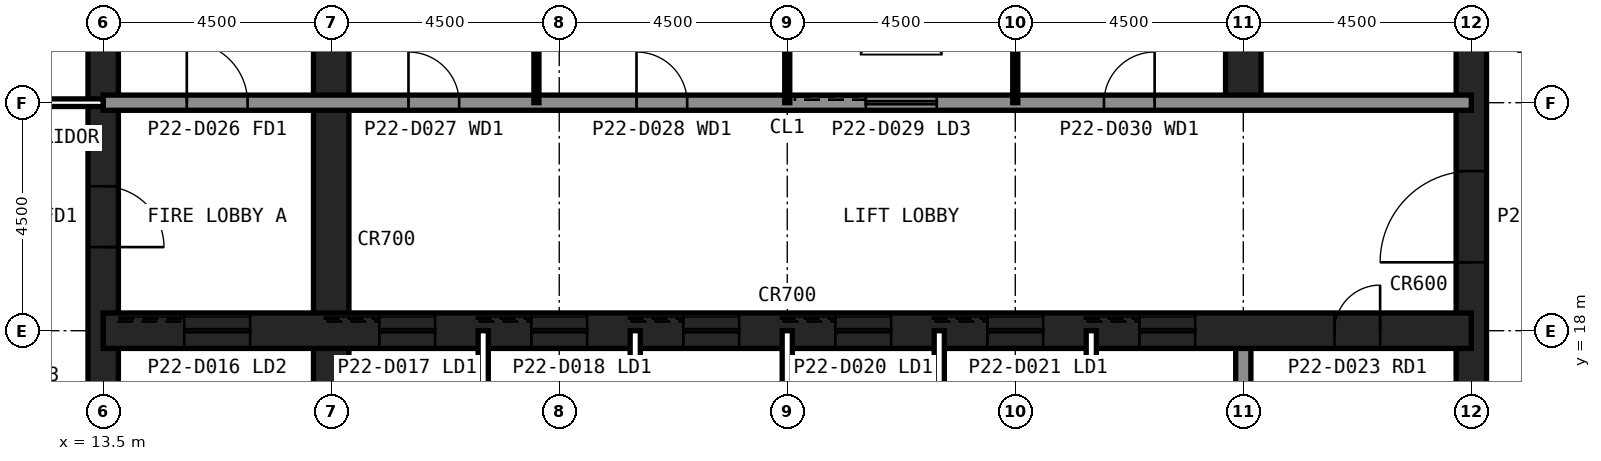
"""IFC4 building model, lengths in metres.
Left out: names, types, materials, properties, quantities, classifications, styles, units other than length and angle.
Written with IfcOpenShell. Run it as: python <this file> out.ifc"""

import sys

from ifc_helpers import new_model, si_unit, direction, frame, frame_2d, origin, place, context, subcontext, project, spatial, rectangle, extrude, element, fill, save


model = new_model("IFC4")
c1 = context("Model", 3, precision=1e-05, world=origin(), true_north=direction((0.0, 1.0)))
c2 = subcontext(c1, "Body", "Model", "MODEL_VIEW")
j1 = project(units=[si_unit("LENGTHUNIT", "METRE"), si_unit("PLANEANGLEUNIT", "RADIAN")], contexts=[c1])
p1 = place(None, origin())
s1 = spatial("IfcSite", under=j1, at=p1, CompositionType="ELEMENT")
p2 = place(p1, origin())
s2 = spatial("IfcBuilding", under=s1, at=p2, CompositionType="ELEMENT")
p3 = place(p2, frame((0.0, 0.0, 96.2)))
s3 = spatial("IfcBuildingStorey", under=s2, at=p3, CompositionType="ELEMENT", Elevation=96.2)
p4 = place(p3, frame((40.5, 13.5, 0.0), z_axis=(0.0, 0.0, 1.0), x_axis=(0.0, 1.0, 0.0)))
e1 = element("IfcWall", 1, at=p4, inside=s3, PredefinedType="SHEAR", context=c2, shape_type="SweptSolid", body=[
    extrude(rectangle(XDim=27.0, YDim=0.6, at=frame_2d((13.5, 0.0))), origin(), (0.0, 0.0, 1.0), 4.2),
])
p5 = place(p4, frame((5.85, 0.0, 0.0)))
e2 = element("IfcOpeningElement", 2, at=p5, cuts=e1, PredefinedType="OPENING", context=c2, shape_type="SweptSolid", body=[
    extrude(rectangle(XDim=1.8, YDim=2.1, at=frame_2d((0.9, 1.05))), frame((0.0, 0.31, 0.0), z_axis=(0.0, -1.0, 0.0), x_axis=(1.0, 0.0, 0.0)), (0.0, 0.0, 1.0), 0.62),
])
p6 = place(p4, frame((19.65, 0.0, 0.0)))
e3 = element("IfcOpeningElement", 3, at=p6, cuts=e1, PredefinedType="OPENING", context=c2, shape_type="SweptSolid", body=[
    extrude(rectangle(XDim=1.2, YDim=2.1, at=frame_2d((0.6, 1.05))), frame((0.0, 0.31, 0.0), z_axis=(0.0, -1.0, 0.0), x_axis=(1.0, 0.0, 0.0)), (0.0, 0.0, 1.0), 0.62),
])
p7 = place(p3, frame((13.5, 40.5, 0.0), z_axis=(0.0, 0.0, 1.0), x_axis=(0.0, -1.0, 0.0)))
e4 = element("IfcWall", 4, at=p7, inside=s3, PredefinedType="SHEAR", context=c2, shape_type="SweptSolid", body=[
    extrude(rectangle(XDim=27.0, YDim=0.6, at=frame_2d((13.5, 0.0))), origin(), (0.0, 0.0, 1.0), 4.2),
])
p8 = place(p7, frame((19.65, 0.0, 0.0)))
e5 = element("IfcOpeningElement", 5, at=p8, cuts=e4, PredefinedType="OPENING", context=c2, shape_type="SweptSolid", body=[
    extrude(rectangle(XDim=1.2, YDim=2.1, at=frame_2d((0.6, 1.05))), frame((0.0, 0.31, 0.0), z_axis=(0.0, -1.0, 0.0), x_axis=(1.0, 0.0, 0.0)), (0.0, 0.0, 1.0), 0.62),
])
p9 = place(p7, frame((5.85, 0.0, 0.0)))
e6 = element("IfcOpeningElement", 6, at=p9, cuts=e4, PredefinedType="OPENING", context=c2, shape_type="SweptSolid", body=[
    extrude(rectangle(XDim=1.8, YDim=2.1, at=frame_2d((0.9, 1.05))), frame((0.0, 0.31, 0.0), z_axis=(0.0, -1.0, 0.0), x_axis=(1.0, 0.0, 0.0)), (0.0, 0.0, 1.0), 0.62),
])
p10 = place(p3, frame((18.0, 13.5, 0.0), z_axis=(0.0, 0.0, 1.0), x_axis=(0.0, 1.0, 0.0)))
e7 = element("IfcWall", 7, at=p10, inside=s3, PredefinedType="SHEAR", context=c2, shape_type="SweptSolid", body=[
    extrude(rectangle(XDim=18.0, YDim=0.7, at=frame_2d((9.0, 0.0))), origin(), (0.0, 0.0, 1.0), 4.2),
])
p11 = place(p3, frame((36.0, 13.5, 0.0), z_axis=(0.0, 0.0, 1.0), x_axis=(0.0, 1.0, 0.0)))
e8 = element("IfcWall", 8, at=p11, inside=s3, PredefinedType="SOLIDWALL", context=c2, shape_type="SweptSolid", body=[
    extrude(rectangle(XDim=4.5, YDim=0.3, at=frame_2d((2.25, 0.0))), origin(), (0.0, 0.0, 1.0), 4.04),
])
p12 = place(p3, frame((36.0, 22.5, 0.0), z_axis=(0.0, 0.0, 1.0), x_axis=(0.0, 1.0, 0.0)))
e9 = element("IfcWall", 9, at=p12, inside=s3, PredefinedType="SHEAR", context=c2, shape_type="SweptSolid", body=[
    extrude(rectangle(XDim=18.0, YDim=0.7, at=frame_2d((9.0, 0.0))), origin(), (0.0, 0.0, 1.0), 4.2),
])
p13 = place(p3, frame((13.5, 18.0, 0.0), z_axis=(0.0, 0.0, 1.0), x_axis=(1.0, 0.0, 0.0)))
e10 = element("IfcWall", 10, at=p13, inside=s3, PredefinedType="SHEAR", context=c2, shape_type="SweptSolid", body=[
    extrude(rectangle(XDim=27.0, YDim=0.7, at=frame_2d((13.5, 0.0))), origin(), (0.0, 0.0, 1.0), 4.2),
])
p14 = place(p13, frame((24.3, 0.0, 0.0)))
e11 = element("IfcOpeningElement", 11, at=p14, cuts=e10, PredefinedType="OPENING", context=c2, shape_type="SweptSolid", body=[
    extrude(rectangle(XDim=0.9, YDim=2.1, at=frame_2d((0.45, 1.05))), frame((0.0, 0.36, 0.0), z_axis=(0.0, -1.0, 0.0), x_axis=(1.0, 0.0, 0.0)), (0.0, 0.0, 1.0), 0.72),
])
p15 = place(p13, frame((5.45, 0.0, 0.0)))
e12 = element("IfcOpeningElement", 12, at=p15, cuts=e10, PredefinedType="OPENING", context=c2, shape_type="SweptSolid", body=[
    extrude(rectangle(XDim=1.1, YDim=2.1, at=frame_2d((0.55, 1.05))), frame((0.0, 0.36, 0.0), z_axis=(0.0, -1.0, 0.0), x_axis=(1.0, 0.0, 0.0)), (0.0, 0.0, 1.0), 0.72),
])
p16 = place(p13, frame((8.45, 0.0, 0.0)))
e13 = element("IfcOpeningElement", 13, at=p16, cuts=e10, PredefinedType="OPENING", context=c2, shape_type="SweptSolid", body=[
    extrude(rectangle(XDim=1.1, YDim=2.1, at=frame_2d((0.55, 1.05))), frame((0.0, 0.36, 0.0), z_axis=(0.0, -1.0, 0.0), x_axis=(1.0, 0.0, 0.0)), (0.0, 0.0, 1.0), 0.72),
])
p17 = place(p13, frame((11.45, 0.0, 0.0)))
e14 = element("IfcOpeningElement", 14, at=p17, cuts=e10, PredefinedType="OPENING", context=c2, shape_type="SweptSolid", body=[
    extrude(rectangle(XDim=1.1, YDim=2.1, at=frame_2d((0.55, 1.05))), frame((0.0, 0.36, 0.0), z_axis=(0.0, -1.0, 0.0), x_axis=(1.0, 0.0, 0.0)), (0.0, 0.0, 1.0), 0.72),
])
p18 = place(p13, frame((14.45, 0.0, 0.0)))
e15 = element("IfcOpeningElement", 15, at=p18, cuts=e10, PredefinedType="OPENING", context=c2, shape_type="SweptSolid", body=[
    extrude(rectangle(XDim=1.1, YDim=2.1, at=frame_2d((0.55, 1.05))), frame((0.0, 0.36, 0.0), z_axis=(0.0, -1.0, 0.0), x_axis=(1.0, 0.0, 0.0)), (0.0, 0.0, 1.0), 0.72),
])
p19 = place(p13, frame((17.45, 0.0, 0.0)))
e16 = element("IfcOpeningElement", 16, at=p19, cuts=e10, PredefinedType="OPENING", context=c2, shape_type="SweptSolid", body=[
    extrude(rectangle(XDim=1.1, YDim=2.1, at=frame_2d((0.55, 1.05))), frame((0.0, 0.36, 0.0), z_axis=(0.0, -1.0, 0.0), x_axis=(1.0, 0.0, 0.0)), (0.0, 0.0, 1.0), 0.72),
])
p20 = place(p13, frame((20.45, 0.0, 0.0)))
e17 = element("IfcOpeningElement", 17, at=p20, cuts=e10, PredefinedType="OPENING", context=c2, shape_type="SweptSolid", body=[
    extrude(rectangle(XDim=1.1, YDim=2.1, at=frame_2d((0.55, 1.05))), frame((0.0, 0.36, 0.0), z_axis=(0.0, -1.0, 0.0), x_axis=(1.0, 0.0, 0.0)), (0.0, 0.0, 1.0), 0.72),
])
p21 = place(p13, frame((1.6, 0.0, 0.0)))
e18 = element("IfcOpeningElement", 18, at=p21, cuts=e10, PredefinedType="OPENING", context=c2, shape_type="SweptSolid", body=[
    extrude(rectangle(XDim=1.3, YDim=2.2, at=frame_2d((0.65, 1.1))), frame((0.0, 0.36, 0.0), z_axis=(0.0, -1.0, 0.0), x_axis=(1.0, 0.0, 0.0)), (0.0, 0.0, 1.0), 0.72),
])
p22 = place(p3, frame((13.5, 22.5, 0.0), z_axis=(0.0, 0.0, 1.0), x_axis=(1.0, 0.0, 0.0)))
e19 = element("IfcWall", 19, at=p22, inside=s3, PredefinedType="SOLIDWALL", context=c2, shape_type="SweptSolid", body=[
    extrude(rectangle(XDim=27.0, YDim=0.3, at=frame_2d((13.5, 0.0))), origin(), (0.0, 0.0, 1.0), 4.04),
])
p23 = place(p22, frame((1.65, 0.0, 0.0)))
e20 = element("IfcOpeningElement", 20, at=p23, cuts=e19, PredefinedType="OPENING", context=c2, shape_type="SweptSolid", body=[
    extrude(rectangle(XDim=1.2, YDim=2.1, at=frame_2d((0.6, 1.05))), frame((0.0, 0.16, 0.0), z_axis=(0.0, -1.0, 0.0), x_axis=(1.0, 0.0, 0.0)), (0.0, 0.0, 1.0), 0.32),
])
p24 = place(p22, frame((6.025, 0.0, 0.0)))
e21 = element("IfcOpeningElement", 21, at=p24, cuts=e19, PredefinedType="OPENING", context=c2, shape_type="SweptSolid", body=[
    extrude(rectangle(XDim=1.0, YDim=2.1, at=frame_2d((0.5, 1.05))), frame((0.0, 0.16, 0.0), z_axis=(0.0, -1.0, 0.0), x_axis=(1.0, 0.0, 0.0)), (0.0, 0.0, 1.0), 0.32),
])
p25 = place(p22, frame((10.525, 0.0, 0.0)))
e22 = element("IfcOpeningElement", 22, at=p25, cuts=e19, PredefinedType="OPENING", context=c2, shape_type="SweptSolid", body=[
    extrude(rectangle(XDim=1.0, YDim=2.1, at=frame_2d((0.5, 1.05))), frame((0.0, 0.16, 0.0), z_axis=(0.0, -1.0, 0.0), x_axis=(1.0, 0.0, 0.0)), (0.0, 0.0, 1.0), 0.32),
])
p26 = place(p22, frame((19.75, 0.0, 0.0)))
e23 = element("IfcOpeningElement", 23, at=p26, cuts=e19, PredefinedType="OPENING", context=c2, shape_type="SweptSolid", body=[
    extrude(rectangle(XDim=1.0, YDim=2.1, at=frame_2d((0.5, 1.05))), frame((0.0, 0.16, 0.0), z_axis=(0.0, -1.0, 0.0), x_axis=(1.0, 0.0, 0.0)), (0.0, 0.0, 1.0), 0.32),
])
p27 = place(p22, frame((15.05, 0.0, 0.0)))
e24 = element("IfcOpeningElement", 24, at=p27, cuts=e19, PredefinedType="OPENING", context=c2, shape_type="SweptSolid", body=[
    extrude(rectangle(XDim=1.4, YDim=2.4, at=frame_2d((0.7, 1.2))), frame((0.0, 0.16, 0.0), z_axis=(0.0, -1.0, 0.0), x_axis=(1.0, 0.0, 0.0)), (0.0, 0.0, 1.0), 0.32),
])
for number, where, z_axis, x_axis in (
    (25, (21.0, 13.5, 0.0), (0.0, 0.0, 1.0), (0.0, 1.0, 0.0)),
    (26, (24.0, 13.5, 0.0), (0.0, 0.0, 1.0), (0.0, 1.0, 0.0)),
    (27, (27.0, 13.5, 0.0), (0.0, 0.0, 1.0), (0.0, 1.0, 0.0)),
    (28, (30.0, 13.5, 0.0), (0.0, 0.0, 1.0), (0.0, 1.0, 0.0)),
    (29, (33.0, 13.5, 0.0), (0.0, 0.0, 1.0), (0.0, 1.0, 0.0)),
):
    element("IfcWall", number, at=place(p3, frame(where, z_axis=z_axis, x_axis=x_axis)), inside=s3, PredefinedType="PARTITIONING", context=c2, shape_type="SweptSolid", body=[
        extrude(rectangle(XDim=4.5, YDim=0.2, at=frame_2d((2.25, 0.0))), origin(), (0.0, 0.0, 1.0), 4.04),
    ])
for number, where, z_axis, x_axis in (
    (30, (22.05, 22.5, 0.0), (0.0, 0.0, 1.0), (0.0, 1.0, 0.0)),
    (31, (27.0, 22.5, 0.0), (0.0, 0.0, 1.0), (0.0, 1.0, 0.0)),
    (32, (31.5, 22.5, 0.0), (0.0, 0.0, 1.0), (0.0, 1.0, 0.0)),
):
    element("IfcWall", number, at=place(p3, frame(where, z_axis=z_axis, x_axis=x_axis)), inside=s3, PredefinedType="PLUMBINGWALL", context=c2, shape_type="SweptSolid", body=[
        extrude(rectangle(XDim=9.0, YDim=0.1, at=frame_2d((4.5, 0.0))), origin(), (0.0, 0.0, 1.0), 4.04),
    ])
p28 = place(p3, frame((9.9, 22.5, 0.0), z_axis=(0.0, 0.0, 1.0), x_axis=(1.0, 0.0, 0.0)))
e33 = element("IfcWall", 33, at=p28, inside=s3, PredefinedType="PARTITIONING", context=c2, shape_type="SweptSolid", body=[
    extrude(rectangle(XDim=3.6, YDim=0.15, at=frame_2d((1.8, 0.0))), origin(), (0.0, 0.0, 1.0), 3.189),
])
p29 = place(p8, origin())
e34 = element("IfcDoor", 34, at=p29, inside=s3, OperationType="SINGLE_SWING_RIGHT", PredefinedType="DOOR", context=c2, shape_type="SweptSolid", body=[
    extrude(rectangle(XDim=1.2, YDim=2.1, at=frame_2d((0.6, 1.05))), frame((0.0, 0.025, 0.0), z_axis=(0.0, -1.0, 0.0), x_axis=(1.0, 0.0, 0.0)), (0.0, 0.0, 1.0), 0.05),
])
fill(e5, e34)
p30 = place(p5, origin())
e35 = element("IfcDoor", 35, at=p30, inside=s3, OperationType="SINGLE_SWING_LEFT", PredefinedType="DOOR", context=c2, shape_type="SweptSolid", body=[
    extrude(rectangle(XDim=1.8, YDim=2.1, at=frame_2d((0.9, 1.05))), frame((0.0, 0.025, 0.0), z_axis=(0.0, -1.0, 0.0), x_axis=(1.0, 0.0, 0.0)), (0.0, 0.0, 1.0), 0.05),
])
fill(e2, e35)
p31 = place(p23, origin())
e36 = element("IfcDoor", 36, at=p31, inside=s3, OperationType="SINGLE_SWING_LEFT", PredefinedType="DOOR", context=c2, shape_type="SweptSolid", body=[
    extrude(rectangle(XDim=1.2, YDim=2.1, at=frame_2d((0.6, 1.05))), frame((0.0, 0.025, 0.0), z_axis=(0.0, -1.0, 0.0), x_axis=(1.0, 0.0, 0.0)), (0.0, 0.0, 1.0), 0.05),
])
fill(e20, e36)
p32 = place(p24, origin())
e37 = element("IfcDoor", 37, at=p32, inside=s3, OperationType="SINGLE_SWING_LEFT", PredefinedType="DOOR", context=c2, shape_type="SweptSolid", body=[
    extrude(rectangle(XDim=1.0, YDim=2.1, at=frame_2d((0.5, 1.05))), frame((0.0, 0.025, 0.0), z_axis=(0.0, -1.0, 0.0), x_axis=(1.0, 0.0, 0.0)), (0.0, 0.0, 1.0), 0.05),
])
fill(e21, e37)
p33 = place(p25, origin())
e38 = element("IfcDoor", 38, at=p33, inside=s3, OperationType="SINGLE_SWING_LEFT", PredefinedType="DOOR", context=c2, shape_type="SweptSolid", body=[
    extrude(rectangle(XDim=1.0, YDim=2.1, at=frame_2d((0.5, 1.05))), frame((0.0, 0.025, 0.0), z_axis=(0.0, -1.0, 0.0), x_axis=(1.0, 0.0, 0.0)), (0.0, 0.0, 1.0), 0.05),
])
fill(e22, e38)
p34 = place(p26, origin())
e39 = element("IfcDoor", 39, at=p34, inside=s3, OperationType="SINGLE_SWING_RIGHT", PredefinedType="DOOR", context=c2, shape_type="SweptSolid", body=[
    extrude(rectangle(XDim=1.0, YDim=2.1, at=frame_2d((0.5, 1.05))), frame((0.0, 0.025, 0.0), z_axis=(0.0, -1.0, 0.0), x_axis=(1.0, 0.0, 0.0)), (0.0, 0.0, 1.0), 0.05),
])
fill(e23, e39)
p35 = place(p14, origin())
e40 = element("IfcDoor", 40, at=p35, inside=s3, OperationType="SINGLE_SWING_RIGHT", PredefinedType="DOOR", context=c2, shape_type="SweptSolid", body=[
    extrude(rectangle(XDim=0.9, YDim=2.1, at=frame_2d((0.45, 1.05))), frame((0.0, 0.025, 0.0), z_axis=(0.0, -1.0, 0.0), x_axis=(1.0, 0.0, 0.0)), (0.0, 0.0, 1.0), 0.05),
])
fill(e11, e40)
p36 = place(p15, origin())
e41 = element("IfcDoor", 41, at=p36, inside=s3, OperationType="SLIDING_TO_LEFT", PredefinedType="DOOR", context=c2, shape_type="SweptSolid", body=[
    extrude(rectangle(XDim=1.1, YDim=2.1, at=frame_2d((0.55, 1.05))), frame((0.0, 0.025, 0.0), z_axis=(0.0, -1.0, 0.0), x_axis=(1.0, 0.0, 0.0)), (0.0, 0.0, 1.0), 0.05),
])
fill(e12, e41)
p37 = place(p16, origin())
e42 = element("IfcDoor", 42, at=p37, inside=s3, OperationType="SLIDING_TO_LEFT", PredefinedType="DOOR", context=c2, shape_type="SweptSolid", body=[
    extrude(rectangle(XDim=1.1, YDim=2.1, at=frame_2d((0.55, 1.05))), frame((0.0, 0.025, 0.0), z_axis=(0.0, -1.0, 0.0), x_axis=(1.0, 0.0, 0.0)), (0.0, 0.0, 1.0), 0.05),
])
fill(e13, e42)
p38 = place(p17, origin())
e43 = element("IfcDoor", 43, at=p38, inside=s3, OperationType="SLIDING_TO_LEFT", PredefinedType="DOOR", context=c2, shape_type="SweptSolid", body=[
    extrude(rectangle(XDim=1.1, YDim=2.1, at=frame_2d((0.55, 1.05))), frame((0.0, 0.025, 0.0), z_axis=(0.0, -1.0, 0.0), x_axis=(1.0, 0.0, 0.0)), (0.0, 0.0, 1.0), 0.05),
])
fill(e14, e43)
p39 = place(p18, origin())
e44 = element("IfcDoor", 44, at=p39, inside=s3, OperationType="SLIDING_TO_LEFT", PredefinedType="DOOR", context=c2, shape_type="SweptSolid", body=[
    extrude(rectangle(XDim=1.1, YDim=2.1, at=frame_2d((0.55, 1.05))), frame((0.0, 0.025, 0.0), z_axis=(0.0, -1.0, 0.0), x_axis=(1.0, 0.0, 0.0)), (0.0, 0.0, 1.0), 0.05),
])
fill(e15, e44)
p40 = place(p19, origin())
e45 = element("IfcDoor", 45, at=p40, inside=s3, OperationType="SLIDING_TO_LEFT", PredefinedType="DOOR", context=c2, shape_type="SweptSolid", body=[
    extrude(rectangle(XDim=1.1, YDim=2.1, at=frame_2d((0.55, 1.05))), frame((0.0, 0.025, 0.0), z_axis=(0.0, -1.0, 0.0), x_axis=(1.0, 0.0, 0.0)), (0.0, 0.0, 1.0), 0.05),
])
fill(e16, e45)
p41 = place(p20, origin())
e46 = element("IfcDoor", 46, at=p41, inside=s3, OperationType="SLIDING_TO_LEFT", PredefinedType="DOOR", context=c2, shape_type="SweptSolid", body=[
    extrude(rectangle(XDim=1.1, YDim=2.1, at=frame_2d((0.55, 1.05))), frame((0.0, 0.025, 0.0), z_axis=(0.0, -1.0, 0.0), x_axis=(1.0, 0.0, 0.0)), (0.0, 0.0, 1.0), 0.05),
])
fill(e17, e46)
p42 = place(p21, origin())
e47 = element("IfcDoor", 47, at=p42, inside=s3, OperationType="SLIDING_TO_LEFT", PredefinedType="DOOR", context=c2, shape_type="SweptSolid", body=[
    extrude(rectangle(XDim=1.3, YDim=2.2, at=frame_2d((0.65, 1.1))), frame((0.0, 0.025, 0.0), z_axis=(0.0, -1.0, 0.0), x_axis=(1.0, 0.0, 0.0)), (0.0, 0.0, 1.0), 0.05),
])
fill(e18, e47)
p43 = place(p27, origin())
e48 = element("IfcDoor", 48, at=p43, inside=s3, OperationType="SLIDING_TO_LEFT", PredefinedType="DOOR", context=c2, shape_type="SweptSolid", body=[
    extrude(rectangle(XDim=1.4, YDim=2.4, at=frame_2d((0.7, 1.2))), frame((0.0, 0.025, 0.0), z_axis=(0.0, -1.0, 0.0), x_axis=(1.0, 0.0, 0.0)), (0.0, 0.0, 1.0), 0.05),
])
fill(e24, e48)
save(model, sys.argv[1])
